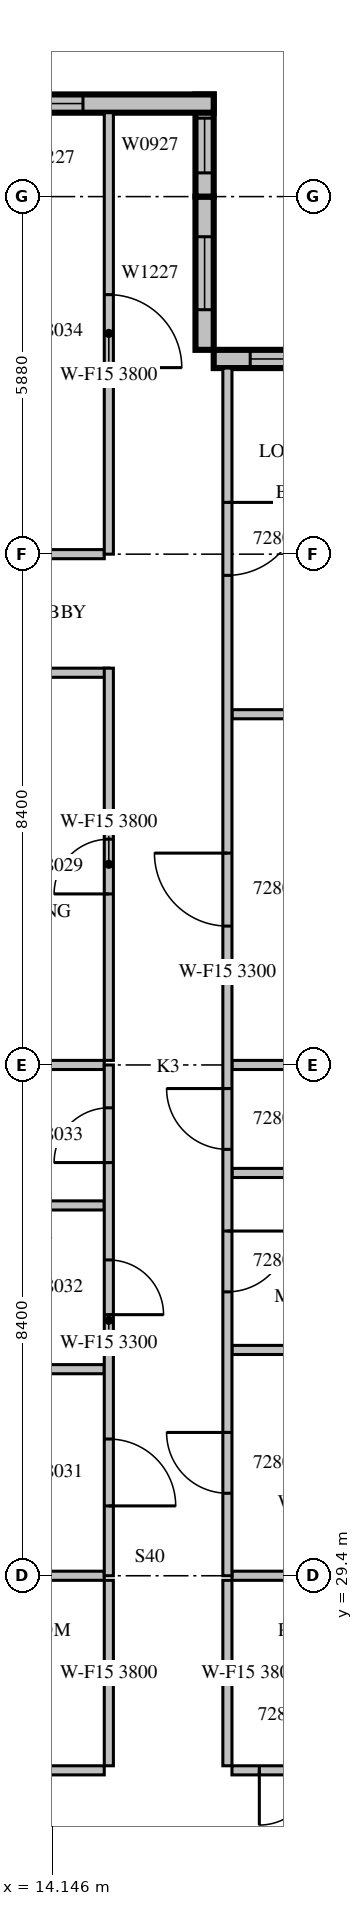
"""IFC4 building model, lengths in metres.
Left out: names, types, materials, properties, quantities, classifications, styles, units other than length and angle.
Written with IfcOpenShell. Run it as: python <this file> out.ifc"""

import sys

from ifc_helpers import new_model, si_unit, direction, frame, frame_2d, origin, place, context, subcontext, project, spatial, rectangle, extrude, source, transform, mapped, element, fill, save


model = new_model("IFC4")
c1 = context("Model", 3, precision=1e-05, world=origin(), true_north=direction((0.0, 1.0)))
c2 = subcontext(c1, "Body", "Model", "MODEL_VIEW")
j1 = project(units=[si_unit("LENGTHUNIT", "METRE"), si_unit("PLANEANGLEUNIT", "RADIAN")], contexts=[c1])
p1 = place(None, origin())
s1 = spatial("IfcSite", under=j1, at=p1, CompositionType="ELEMENT")
p2 = place(p1, origin())
s2 = spatial("IfcBuilding", under=s1, at=p2, CompositionType="ELEMENT")
p3 = place(p2, frame((0.0, 0.0, 128.7)))
s3 = spatial("IfcBuildingStorey", under=s2, at=p3, CompositionType="ELEMENT", Elevation=128.7)
m1 = source(origin(), c2, "Body", "SweptSolid", [
    extrude(rectangle(XDim=4.2, YDim=0.3, at=frame_2d((2.1, 0.0))), origin(), (0.0, 0.0, 1.0), 3.8),
])
p4 = place(p3, frame((21.0, 49.41, 0.0), z_axis=(0.0, 0.0, 1.0), x_axis=(-1.0, 0.0, 0.0)))
e1 = element("IfcWall", 1, at=p4, inside=s3, PredefinedType="STANDARD", context=c2, shape_type="MappedRepresentation", body=[
    mapped(m1, transform((0.0, 0.0, 0.0), scale=1.0)),
])
m2 = source(origin(), c2, "Body", "SweptSolid", [
    extrude(rectangle(XDim=3.0, YDim=2.7, at=frame_2d((1.5, 1.35))), frame((0.0, 0.16, 0.0), z_axis=(0.0, -1.0, 0.0), x_axis=(1.0, 0.0, 0.0)), (0.0, 0.0, 1.0), 0.32),
])
p5 = place(p4, frame((0.6, 0.0, 0.6)))
e2 = element("IfcOpeningElement", 2, at=p5, cuts=e1, PredefinedType="OPENING", context=c2, shape_type="MappedRepresentation", body=[
    mapped(m2, transform((0.0, 0.0, 0.0), scale=1.0)),
])
m3 = source(origin(), c2, "Body", "SweptSolid", [
    extrude(rectangle(XDim=2.52, YDim=0.3, at=frame_2d((1.26, 0.0))), origin(), (0.0, 0.0, 1.0), 3.8),
])
p6 = place(p3, frame((16.65, 49.56, 0.0), z_axis=(0.0, 0.0, 1.0), x_axis=(0.0, 1.0, 0.0)))
e3 = element("IfcWall", 3, at=p6, inside=s3, PredefinedType="STANDARD", context=c2, shape_type="MappedRepresentation", body=[
    mapped(m3, transform((0.0, 0.0, 0.0), scale=1.0)),
])
m4 = source(origin(), c2, "Body", "SweptSolid", [
    extrude(rectangle(XDim=1.2, YDim=2.7, at=frame_2d((0.6, 1.35))), frame((0.0, 0.16, 0.0), z_axis=(0.0, -1.0, 0.0), x_axis=(1.0, 0.0, 0.0)), (0.0, 0.0, 1.0), 0.32),
])
p7 = place(p6, frame((0.66, 0.0, 0.6)))
e4 = element("IfcOpeningElement", 4, at=p7, cuts=e3, PredefinedType="OPENING", context=c2, shape_type="MappedRepresentation", body=[
    mapped(m4, transform((0.0, 0.0, 0.0), scale=1.0)),
])
m5 = source(origin(), c2, "Body", "SweptSolid", [
    extrude(rectangle(XDim=1.68, YDim=0.3, at=frame_2d((0.84, 0.0))), origin(), (0.0, 0.0, 1.0), 3.8),
])
p8 = place(p3, frame((16.65, 52.08, 0.0), z_axis=(0.0, 0.0, 1.0), x_axis=(0.0, 1.0, 0.0)))
e5 = element("IfcWall", 5, at=p8, inside=s3, PredefinedType="STANDARD", context=c2, shape_type="MappedRepresentation", body=[
    mapped(m5, transform((0.0, 0.0, 0.0), scale=1.0)),
])
m6 = source(origin(), c2, "Body", "SweptSolid", [
    extrude(rectangle(XDim=0.9, YDim=2.7, at=frame_2d((0.45, 1.35))), frame((0.0, 0.16, 0.0), z_axis=(0.0, -1.0, 0.0), x_axis=(1.0, 0.0, 0.0)), (0.0, 0.0, 1.0), 0.32),
])
p9 = place(p8, frame((0.39, 0.0, 0.6)))
e6 = element("IfcOpeningElement", 6, at=p9, cuts=e5, PredefinedType="OPENING", context=c2, shape_type="MappedRepresentation", body=[
    mapped(m6, transform((0.0, 0.0, 0.0), scale=1.0)),
])
m7 = source(origin(), c2, "Body", "SweptSolid", [
    extrude(rectangle(XDim=10.5, YDim=0.3, at=frame_2d((5.25, 0.0))), origin(), (0.0, 0.0, 1.0), 3.8),
])
p10 = place(p3, frame((16.8, 53.61, 0.0), z_axis=(0.0, 0.0, 1.0), x_axis=(-1.0, 0.0, 0.0)))
e7 = element("IfcWall", 7, at=p10, inside=s3, PredefinedType="STANDARD", context=c2, shape_type="MappedRepresentation", body=[
    mapped(m7, transform((0.0, 0.0, 0.0), scale=1.0)),
])
p11 = place(p10, frame((2.15, 0.0, 0.6)))
e8 = element("IfcOpeningElement", 8, at=p11, cuts=e7, PredefinedType="OPENING", context=c2, shape_type="MappedRepresentation", body=[
    mapped(m4, transform((0.0, 0.0, 0.0), scale=1.0)),
])
m8 = source(origin(), c2, "Body", "SweptSolid", [
    extrude(rectangle(XDim=1.8, YDim=2.7, at=frame_2d((0.9, 1.35))), frame((0.0, 0.16, 0.0), z_axis=(0.0, -1.0, 0.0), x_axis=(1.0, 0.0, 0.0)), (0.0, 0.0, 1.0), 0.32),
])
p12 = place(p10, frame((8.025, 0.0, 0.6)))
e9 = element("IfcOpeningElement", 9, at=p12, cuts=e7, PredefinedType="OPENING", context=c2, shape_type="MappedRepresentation", body=[
    mapped(m8, transform((0.0, 0.0, 0.0), scale=1.0)),
])
m9 = source(origin(), c2, "Body", "SweptSolid", [
    extrude(rectangle(XDim=4.295, YDim=0.15, at=frame_2d((2.147, 0.0))), origin(), (0.0, 0.0, 1.0), 3.8),
])
p13 = place(p3, frame((10.705, 26.2, 0.0), z_axis=(0.0, 0.0, 1.0), x_axis=(1.0, 0.0, 0.0)))
e10 = element("IfcWall", 10, at=p13, inside=s3, PredefinedType="PARTITIONING", context=c2, shape_type="MappedRepresentation", body=[
    mapped(m9, transform((0.0, 0.0, 0.0), scale=1.0)),
])
m10 = source(origin(), c2, "Body", "SweptSolid", [
    extrude(rectangle(XDim=0.9, YDim=2.1, at=frame_2d((0.45, 1.05))), frame((0.0, 0.085, 0.0), z_axis=(0.0, -1.0, 0.0), x_axis=(1.0, 0.0, 0.0)), (0.0, 0.0, 1.0), 0.17),
])
p14 = place(p13, frame((2.283, 0.0, 0.0)))
e11 = element("IfcOpeningElement", 11, at=p14, cuts=e10, PredefinedType="OPENING", context=c2, shape_type="MappedRepresentation", body=[
    mapped(m10, transform((0.0, 0.0, 0.0), scale=1.0)),
])
m11 = source(origin(), c2, "Body", "SweptSolid", [
    extrude(rectangle(XDim=3.6, YDim=0.15, at=frame_2d((1.8, 0.0))), origin(), (0.0, 0.0, 1.0), 3.8),
])
p15 = place(p3, frame((17.1, 26.2, 0.0), z_axis=(0.0, 0.0, 1.0), x_axis=(1.0, 0.0, 0.0)))
e12 = element("IfcWall", 12, at=p15, inside=s3, PredefinedType="PARTITIONING", context=c2, shape_type="MappedRepresentation", body=[
    mapped(m11, transform((0.0, 0.0, 0.0), scale=1.0)),
])
p16 = place(p15, frame((0.45, 0.0, 0.0)))
e13 = element("IfcOpeningElement", 13, at=p16, cuts=e12, PredefinedType="OPENING", context=c2, shape_type="MappedRepresentation", body=[
    mapped(m10, transform((0.0, 0.0, 0.0), scale=1.0)),
])
m12 = source(origin(), c2, "Body", "SweptSolid", [
    extrude(rectangle(XDim=3.05, YDim=0.15, at=frame_2d((1.525, 0.0))), origin(), (0.0, 0.0, 1.0), 3.8),
])
for number, where, z_axis, x_axis in (
    (14, (15.075, 26.275, 0.0), (0.0, 0.0, 1.0), (0.0, 1.0, 0.0)),
    (15, (17.025, 29.325, 0.0), (0.0, 0.0, 1.0), (0.0, -1.0, 0.0)),
):
    element("IfcWall", number, at=place(p3, frame(where, z_axis=z_axis, x_axis=x_axis)), inside=s3, PredefinedType="PARTITIONING", context=c2, shape_type="MappedRepresentation", body=[
        mapped(m12, transform((0.0, 0.0, 0.0), scale=1.0)),
    ])
m13 = source(origin(), c2, "Body", "SweptSolid", [
    extrude(rectangle(XDim=3.976, YDim=0.15, at=frame_2d((1.988, 0.0))), origin(), (0.0, 0.0, 1.0), 3.8),
])
p17 = place(p3, frame((15.0, 29.4, 0.0), z_axis=(0.0, 0.0, 1.0), x_axis=(-1.0, 0.0, 0.0)))
e16 = element("IfcWall", 16, at=p17, inside=s3, PredefinedType="PARTITIONING", context=c2, shape_type="MappedRepresentation", body=[
    mapped(m13, transform((0.0, 0.0, 0.0), scale=1.0)),
])
m14 = source(origin(), c2, "Body", "SweptSolid", [
    extrude(rectangle(XDim=2.851, YDim=0.15, at=frame_2d((1.425, 0.0))), origin(), (0.0, 0.0, 1.0), 3.8),
])
p18 = place(p3, frame((19.951, 29.4, 0.0), z_axis=(0.0, 0.0, 1.0), x_axis=(-1.0, 0.0, 0.0)))
e17 = element("IfcWall", 17, at=p18, inside=s3, PredefinedType="PARTITIONING", context=c2, shape_type="MappedRepresentation", body=[
    mapped(m14, transform((0.0, 0.0, 0.0), scale=1.0)),
])
m15 = source(origin(), c2, "Body", "SweptSolid", [
    extrude(rectangle(XDim=2.775, YDim=0.15, at=frame_2d((1.387, 0.0))), origin(), (0.0, 0.0, 1.0), 3.8),
])
p19 = place(p3, frame((15.075, 44.25, 0.0), z_axis=(0.0, 0.0, 1.0), x_axis=(-1.0, 0.0, 0.0)))
e18 = element("IfcWall", 18, at=p19, inside=s3, PredefinedType="PARTITIONING", context=c2, shape_type="MappedRepresentation", body=[
    mapped(m15, transform((0.0, 0.0, 0.0), scale=1.0)),
])
m16 = source(origin(), c2, "Body", "SweptSolid", [
    extrude(rectangle(XDim=6.45, YDim=0.15, at=frame_2d((3.225, 0.0))), origin(), (0.0, 0.0, 1.0), 3.8),
])
p20 = place(p3, frame((15.075, 37.875, 0.0), z_axis=(0.0, 0.0, 1.0), x_axis=(0.0, 1.0, 0.0)))
e19 = element("IfcWall", 19, at=p20, inside=s3, PredefinedType="PARTITIONING", context=c2, shape_type="MappedRepresentation", body=[
    mapped(m16, transform((0.0, 0.0, 0.0), scale=1.0)),
])
p21 = place(p20, frame((2.737, 0.0, 0.0)))
e20 = element("IfcOpeningElement", 20, at=p21, cuts=e19, PredefinedType="OPENING", context=c2, shape_type="MappedRepresentation", body=[
    mapped(m10, transform((0.0, 0.0, 0.0), scale=1.0)),
])
for number, where, z_axis, x_axis in (
    (21, (15.0, 32.797, 0.0), (0.0, 0.0, 1.0), (-1.0, 0.0, 0.0)),
    (22, (15.0, 35.49, 0.0), (0.0, 0.0, 1.0), (-1.0, 0.0, 0.0)),
):
    element("IfcWall", number, at=place(p3, frame(where, z_axis=z_axis, x_axis=x_axis)), inside=s3, PredefinedType="PARTITIONING", context=c2, shape_type="MappedRepresentation", body=[
        mapped(m9, transform((0.0, 0.0, 0.0), scale=1.0)),
    ])
p22 = place(p3, frame((15.0, 37.8, 0.0), z_axis=(0.0, 0.0, 1.0), x_axis=(-1.0, 0.0, 0.0)))
e23 = element("IfcWall", 23, at=p22, inside=s3, PredefinedType="PARTITIONING", context=c2, shape_type="MappedRepresentation", body=[
    mapped(m13, transform((0.0, 0.0, 0.0), scale=1.0)),
])
m17 = source(origin(), c2, "Body", "SweptSolid", [
    extrude(rectangle(XDim=3.825, YDim=0.15, at=frame_2d((1.913, 0.0))), origin(), (0.0, 0.0, 1.0), 3.8),
])
p23 = place(p3, frame((15.0, 46.2, 0.0), z_axis=(0.0, 0.0, 1.0), x_axis=(-1.0, 0.0, 0.0)))
e24 = element("IfcWall", 24, at=p23, inside=s3, PredefinedType="PARTITIONING", context=c2, shape_type="MappedRepresentation", body=[
    mapped(m17, transform((0.0, 0.0, 0.0), scale=1.0)),
])
m18 = source(origin(), c2, "Body", "SweptSolid", [
    extrude(rectangle(XDim=3.6, YDim=0.15, at=frame_2d((1.8, 0.0))), origin(), (0.0, 0.0, 1.0), 2.8),
])
for number, where, z_axis, x_axis in (
    (25, (17.1, 33.113, 0.0), (0.0, 0.0, 1.0), (1.0, 0.0, 0.0)),
    (26, (17.1, 36.024, 0.0), (0.0, 0.0, 1.0), (1.0, 0.0, 0.0)),
):
    element("IfcWall", number, at=place(p3, frame(where, z_axis=z_axis, x_axis=x_axis)), inside=s3, PredefinedType="PARTITIONING", context=c2, shape_type="MappedRepresentation", body=[
        mapped(m18, transform((0.0, 0.0, 0.0), scale=1.0)),
    ])
p24 = place(p3, frame((17.1, 43.568, 0.0), z_axis=(0.0, 0.0, 1.0), x_axis=(1.0, 0.0, 0.0)))
e27 = element("IfcWall", 27, at=p24, inside=s3, PredefinedType="PARTITIONING", context=c2, shape_type="MappedRepresentation", body=[
    mapped(m11, transform((0.0, 0.0, 0.0), scale=1.0)),
])
p25 = place(p3, frame((19.951, 37.8, 0.0), z_axis=(0.0, 0.0, 1.0), x_axis=(-1.0, 0.0, 0.0)))
e28 = element("IfcWall", 28, at=p25, inside=s3, PredefinedType="PARTITIONING", context=c2, shape_type="MappedRepresentation", body=[
    mapped(m14, transform((0.0, 0.0, 0.0), scale=1.0)),
])
m19 = source(origin(), c2, "Body", "SweptSolid", [
    extrude(rectangle(XDim=8.4, YDim=0.15, at=frame_2d((4.2, 0.0))), origin(), (0.0, 0.0, 1.0), 3.3),
])
p26 = place(p3, frame((15.075, 29.4, 0.0), z_axis=(0.0, 0.0, 1.0), x_axis=(0.0, 1.0, 0.0)))
e29 = element("IfcWall", 29, at=p26, inside=s3, PredefinedType="PARTITIONING", context=c2, shape_type="MappedRepresentation", body=[
    mapped(m19, transform((0.0, 0.0, 0.0), scale=1.0)),
])
m20 = source(origin(), c2, "Body", "SweptSolid", [
    extrude(rectangle(XDim=1.1, YDim=2.1, at=frame_2d((0.55, 1.05))), frame((0.0, 0.085, 0.0), z_axis=(0.0, -1.0, 0.0), x_axis=(1.0, 0.0, 0.0)), (0.0, 0.0, 1.0), 0.17),
])
p27 = place(p26, frame((1.149, 0.0, 0.0)))
e30 = element("IfcOpeningElement", 30, at=p27, cuts=e29, PredefinedType="OPENING", context=c2, shape_type="MappedRepresentation", body=[
    mapped(m20, transform((0.0, 0.0, 0.0), scale=1.0)),
])
p28 = place(p26, frame((4.293, 0.0, 0.0)))
e31 = element("IfcOpeningElement", 31, at=p28, cuts=e29, PredefinedType="OPENING", context=c2, shape_type="MappedRepresentation", body=[
    mapped(m10, transform((0.0, 0.0, 0.0), scale=1.0)),
])
p29 = place(p26, frame((6.795, 0.0, 0.0)))
e32 = element("IfcOpeningElement", 32, at=p29, cuts=e29, PredefinedType="OPENING", context=c2, shape_type="MappedRepresentation", body=[
    mapped(m10, transform((0.0, 0.0, 0.0), scale=1.0)),
])
m21 = source(origin(), c2, "Body", "SweptSolid", [
    extrude(rectangle(XDim=7.26, YDim=0.15, at=frame_2d((3.63, 0.0))), origin(), (0.0, 0.0, 1.0), 3.8),
])
p30 = place(p3, frame((15.075, 46.2, 0.0), z_axis=(0.0, 0.0, 1.0), x_axis=(0.0, 1.0, 0.0)))
e33 = element("IfcWall", 33, at=p30, inside=s3, PredefinedType="PARTITIONING", context=c2, shape_type="MappedRepresentation", body=[
    mapped(m21, transform((0.0, 0.0, 0.0), scale=1.0)),
])
m22 = source(origin(), c2, "Body", "SweptSolid", [
    extrude(rectangle(XDim=1.2, YDim=2.1, at=frame_2d((0.6, 1.05))), frame((0.0, 0.085, 0.0), z_axis=(0.0, -1.0, 0.0), x_axis=(1.0, 0.0, 0.0)), (0.0, 0.0, 1.0), 0.17),
])
p31 = place(p30, frame((3.067, 0.0, 0.0)))
e34 = element("IfcOpeningElement", 34, at=p31, cuts=e33, PredefinedType="OPENING", context=c2, shape_type="MappedRepresentation", body=[
    mapped(m22, transform((0.0, 0.0, 0.0), scale=1.0)),
])
m23 = source(origin(), c2, "Body", "SweptSolid", [
    extrude(rectangle(XDim=19.86, YDim=0.15, at=frame_2d((9.93, 0.0))), origin(), (0.0, 0.0, 1.0), 3.3),
])
p32 = place(p3, frame((17.025, 49.26, 0.0), z_axis=(0.0, 0.0, 1.0), x_axis=(0.0, -1.0, 0.0)))
e35 = element("IfcWall", 35, at=p32, inside=s3, PredefinedType="PARTITIONING", context=c2, shape_type="MappedRepresentation", body=[
    mapped(m23, transform((0.0, 0.0, 0.0), scale=1.0)),
])
m24 = source(origin(), c2, "Body", "SweptSolid", [
    extrude(rectangle(XDim=1.0, YDim=2.1, at=frame_2d((0.5, 1.05))), frame((0.0, 0.085, 0.0), z_axis=(0.0, -1.0, 0.0), x_axis=(1.0, 0.0, 0.0)), (0.0, 0.0, 1.0), 0.17),
])
p33 = place(p32, frame((17.503, 0.0, 0.0)))
e36 = element("IfcOpeningElement", 36, at=p33, cuts=e35, PredefinedType="OPENING", context=c2, shape_type="MappedRepresentation", body=[
    mapped(m24, transform((0.0, 0.0, 0.0), scale=1.0)),
])
p34 = place(p32, frame((14.191, 0.0, 0.0)))
e37 = element("IfcOpeningElement", 37, at=p34, cuts=e35, PredefinedType="OPENING", context=c2, shape_type="MappedRepresentation", body=[
    mapped(m24, transform((0.0, 0.0, 0.0), scale=1.0)),
])
p35 = place(p32, frame((11.848, 0.0, 0.0)))
e38 = element("IfcOpeningElement", 38, at=p35, cuts=e35, PredefinedType="OPENING", context=c2, shape_type="MappedRepresentation", body=[
    mapped(m24, transform((0.0, 0.0, 0.0), scale=1.0)),
])
p36 = place(p32, frame((7.976, 0.0, 0.0)))
e39 = element("IfcOpeningElement", 39, at=p36, cuts=e35, PredefinedType="OPENING", context=c2, shape_type="MappedRepresentation", body=[
    mapped(m22, transform((0.0, 0.0, 0.0), scale=1.0)),
])
p37 = place(p32, frame((2.209, 0.0, 0.0)))
e40 = element("IfcOpeningElement", 40, at=p37, cuts=e35, PredefinedType="OPENING", context=c2, shape_type="MappedRepresentation", body=[
    mapped(m22, transform((0.0, 0.0, 0.0), scale=1.0)),
])
m25 = source(origin(), c2, "Body", "SweptSolid", [
    extrude(rectangle(XDim=3.0, YDim=2.7, at=frame_2d((1.5, 1.35))), frame((0.0, 0.03, 0.0), z_axis=(0.0, -1.0, 0.0), x_axis=(1.0, 0.0, 0.0)), (0.0, 0.0, 1.0), 0.06),
])
p38 = place(p5, origin())
e41 = element("IfcWindow", 41, at=p38, inside=s3, PartitioningType="SINGLE_PANEL", PredefinedType="WINDOW", context=c2, shape_type="MappedRepresentation", body=[
    mapped(m25, transform((0.0, 0.0, 0.0), scale=1.0)),
])
fill(e2, e41)
m26 = source(origin(), c2, "Body", "SweptSolid", [
    extrude(rectangle(XDim=1.2, YDim=2.7, at=frame_2d((0.6, 1.35))), frame((0.0, 0.03, 0.0), z_axis=(0.0, -1.0, 0.0), x_axis=(1.0, 0.0, 0.0)), (0.0, 0.0, 1.0), 0.06),
])
p39 = place(p7, origin())
e42 = element("IfcWindow", 42, at=p39, inside=s3, PartitioningType="SINGLE_PANEL", PredefinedType="WINDOW", context=c2, shape_type="MappedRepresentation", body=[
    mapped(m26, transform((0.0, 0.0, 0.0), scale=1.0)),
])
fill(e4, e42)
m27 = source(origin(), c2, "Body", "SweptSolid", [
    extrude(rectangle(XDim=0.9, YDim=2.7, at=frame_2d((0.45, 1.35))), frame((0.0, 0.03, 0.0), z_axis=(0.0, -1.0, 0.0), x_axis=(1.0, 0.0, 0.0)), (0.0, 0.0, 1.0), 0.06),
])
p40 = place(p9, origin())
e43 = element("IfcWindow", 43, at=p40, inside=s3, PartitioningType="SINGLE_PANEL", PredefinedType="WINDOW", context=c2, shape_type="MappedRepresentation", body=[
    mapped(m27, transform((0.0, 0.0, 0.0), scale=1.0)),
])
fill(e6, e43)
p41 = place(p11, origin())
e44 = element("IfcWindow", 44, at=p41, inside=s3, PartitioningType="SINGLE_PANEL", PredefinedType="WINDOW", context=c2, shape_type="MappedRepresentation", body=[
    mapped(m26, transform((0.0, 0.0, 0.0), scale=1.0)),
])
fill(e8, e44)
m28 = source(origin(), c2, "Body", "SweptSolid", [
    extrude(rectangle(XDim=0.9, YDim=2.1, at=frame_2d((0.45, 1.05))), frame((0.0, 0.025, 0.0), z_axis=(0.0, -1.0, 0.0), x_axis=(1.0, 0.0, 0.0)), (0.0, 0.0, 1.0), 0.05),
])
p42 = place(p16, origin())
e45 = element("IfcDoor", 45, at=p42, inside=s3, OperationType="SINGLE_SWING_RIGHT", PredefinedType="DOOR", context=c2, shape_type="MappedRepresentation", body=[
    mapped(m28, transform((0.0, 0.0, 0.0), scale=1.0)),
])
fill(e13, e45)
p43 = place(p21, origin())
e46 = element("IfcDoor", 46, at=p43, inside=s3, OperationType="SINGLE_SWING_LEFT", PredefinedType="DOOR", context=c2, shape_type="MappedRepresentation", body=[
    mapped(m28, transform((0.0, 0.0, 0.0), scale=1.0)),
])
fill(e20, e46)
m29 = source(origin(), c2, "Body", "SweptSolid", [
    extrude(rectangle(XDim=1.1, YDim=2.1, at=frame_2d((0.55, 1.05))), frame((0.0, 0.025, 0.0), z_axis=(0.0, -1.0, 0.0), x_axis=(1.0, 0.0, 0.0)), (0.0, 0.0, 1.0), 0.05),
])
p44 = place(p27, origin())
e47 = element("IfcDoor", 47, at=p44, inside=s3, OperationType="SINGLE_SWING_RIGHT", PredefinedType="DOOR", context=c2, shape_type="MappedRepresentation", body=[
    mapped(m29, transform((0.0, 0.0, 0.0), scale=1.0)),
])
fill(e30, e47)
p45 = place(p28, origin())
e48 = element("IfcDoor", 48, at=p45, inside=s3, OperationType="SINGLE_SWING_RIGHT", PredefinedType="DOOR", context=c2, shape_type="MappedRepresentation", body=[
    mapped(m28, transform((0.0, 0.0, 0.0), scale=1.0)),
])
fill(e31, e48)
p46 = place(p29, origin())
e49 = element("IfcDoor", 49, at=p46, inside=s3, OperationType="SINGLE_SWING_LEFT", PredefinedType="DOOR", context=c2, shape_type="MappedRepresentation", body=[
    mapped(m28, transform((0.0, 0.0, 0.0), scale=1.0)),
])
fill(e32, e49)
m30 = source(origin(), c2, "Body", "SweptSolid", [
    extrude(rectangle(XDim=1.2, YDim=2.1, at=frame_2d((0.6, 1.05))), frame((0.0, 0.025, 0.0), z_axis=(0.0, -1.0, 0.0), x_axis=(1.0, 0.0, 0.0)), (0.0, 0.0, 1.0), 0.05),
])
p47 = place(p31, origin())
e50 = element("IfcDoor", 50, at=p47, inside=s3, OperationType="SINGLE_SWING_RIGHT", PredefinedType="DOOR", context=c2, shape_type="MappedRepresentation", body=[
    mapped(m30, transform((0.0, 0.0, 0.0), scale=1.0)),
])
fill(e34, e50)
m31 = source(origin(), c2, "Body", "SweptSolid", [
    extrude(rectangle(XDim=1.0, YDim=2.1, at=frame_2d((0.5, 1.05))), frame((0.0, 0.025, 0.0), z_axis=(0.0, -1.0, 0.0), x_axis=(1.0, 0.0, 0.0)), (0.0, 0.0, 1.0), 0.05),
])
p48 = place(p33, origin())
e51 = element("IfcDoor", 51, at=p48, inside=s3, OperationType="SINGLE_SWING_RIGHT", PredefinedType="DOOR", context=c2, shape_type="MappedRepresentation", body=[
    mapped(m31, transform((0.0, 0.0, 0.0), scale=1.0)),
])
fill(e36, e51)
p49 = place(p34, origin())
e52 = element("IfcDoor", 52, at=p49, inside=s3, OperationType="SINGLE_SWING_LEFT", PredefinedType="DOOR", context=c2, shape_type="MappedRepresentation", body=[
    mapped(m31, transform((0.0, 0.0, 0.0), scale=1.0)),
])
fill(e37, e52)
p50 = place(p35, origin())
e53 = element("IfcDoor", 53, at=p50, inside=s3, OperationType="SINGLE_SWING_RIGHT", PredefinedType="DOOR", context=c2, shape_type="MappedRepresentation", body=[
    mapped(m31, transform((0.0, 0.0, 0.0), scale=1.0)),
])
fill(e38, e53)
p51 = place(p36, origin())
e54 = element("IfcDoor", 54, at=p51, inside=s3, OperationType="SINGLE_SWING_RIGHT", PredefinedType="DOOR", context=c2, shape_type="MappedRepresentation", body=[
    mapped(m30, transform((0.0, 0.0, 0.0), scale=1.0)),
])
fill(e39, e54)
p52 = place(p37, origin())
e55 = element("IfcDoor", 55, at=p52, inside=s3, OperationType="SINGLE_SWING_LEFT", PredefinedType="DOOR", context=c2, shape_type="MappedRepresentation", body=[
    mapped(m30, transform((0.0, 0.0, 0.0), scale=1.0)),
])
fill(e40, e55)
save(model, sys.argv[1])
